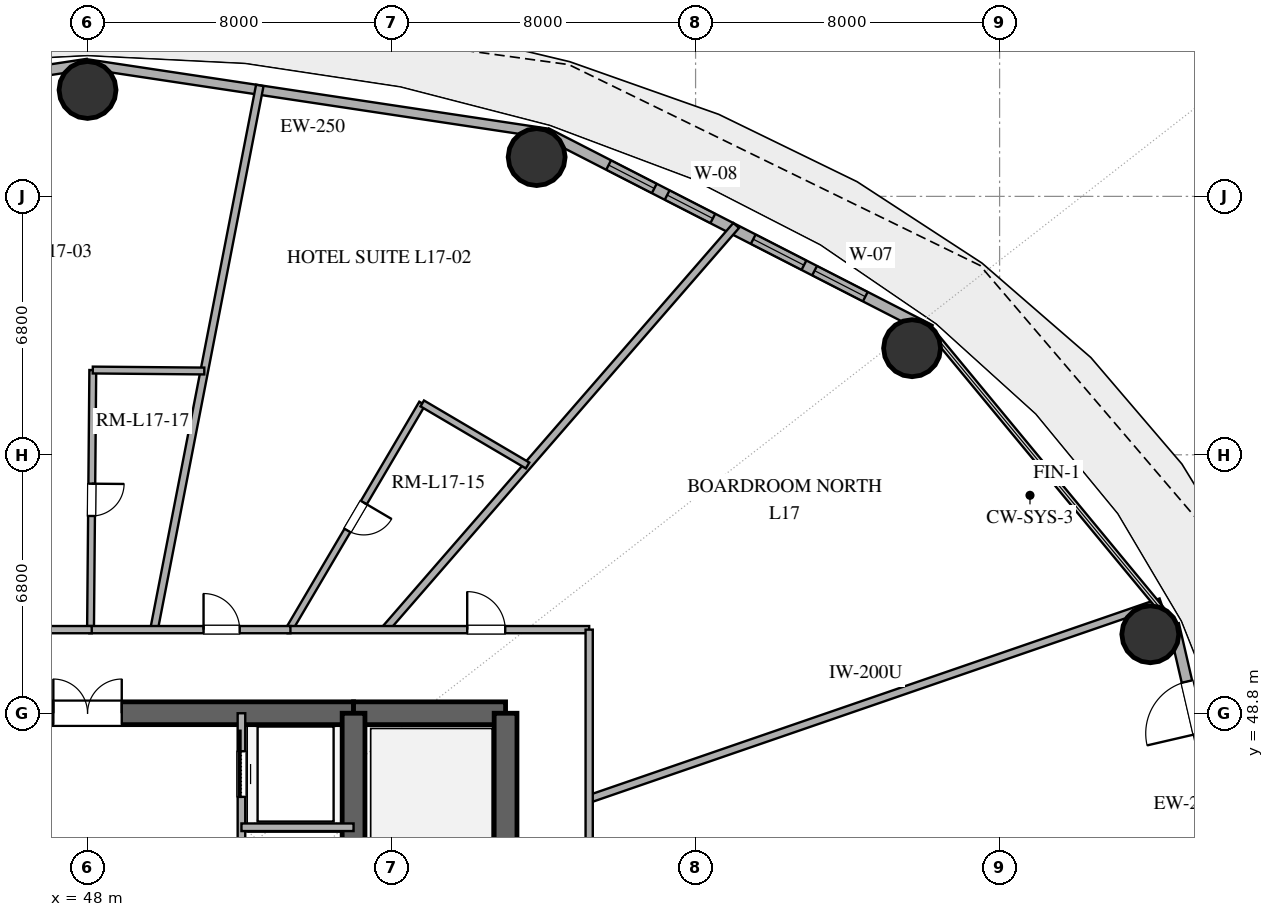
"""IFC4 building model, lengths in metres.
Left out: names, types, materials, properties, quantities, classifications, styles, units other than length and angle.
Written with IfcOpenShell. Run it as: python <this file> out.ifc"""

import sys

from ifc_helpers import new_model, si_unit, direction, frame, frame_2d, origin, origin_2d, place, context, subcontext, project, spatial, rectangle, hollow_circle, extrude, element, fill, save


model = new_model("IFC4")
c1 = context("Model", 3, precision=1e-05, world=origin(), true_north=direction((0.0, 1.0)))
c2 = subcontext(c1, "Body", "Model", "MODEL_VIEW")
j1 = project(units=[si_unit("LENGTHUNIT", "METRE"), si_unit("PLANEANGLEUNIT", "RADIAN")], contexts=[c1])
p1 = place(None, origin())
s1 = spatial("IfcSite", under=j1, at=p1, CompositionType="ELEMENT")
p2 = place(p1, origin())
s2 = spatial("IfcBuilding", under=s1, at=p2, CompositionType="ELEMENT")
p3 = place(p2, frame((0.0, 0.0, 71.4)))
s3 = spatial("IfcBuildingStorey", under=s2, at=p3, CompositionType="ELEMENT", Elevation=71.4)
p4 = place(p3, frame((41.0, 48.8, 0.0), z_axis=(0.0, 0.0, 1.0), x_axis=(1.0, 0.0, 0.0)))
e1 = element("IfcWall", 1, at=p4, inside=s3, PredefinedType="SHEAR", context=c2, shape_type="SweptSolid", body=[
    extrude(rectangle(XDim=14.0, YDim=0.6, at=frame_2d((7.0, 0.0))), origin(), (0.0, 0.0, 1.0), 3.38),
])
p5 = place(p4, frame((6.1, 0.0, 0.0)))
e2 = element("IfcOpeningElement", 2, at=p5, cuts=e1, PredefinedType="OPENING", context=c2, shape_type="SweptSolid", body=[
    extrude(rectangle(XDim=1.8, YDim=2.25, at=frame_2d((0.9, 1.125))), frame((0.0, 0.31, 0.0), z_axis=(0.0, -1.0, 0.0), x_axis=(1.0, 0.0, 0.0)), (0.0, 0.0, 1.0), 0.62),
])
p6 = place(p3, frame((55.0, 48.8, 0.0), z_axis=(0.0, 0.0, 1.0), x_axis=(1.0, 0.0, 0.0)))
e3 = element("IfcWall", 3, at=p6, inside=s3, PredefinedType="SHEAR", context=c2, shape_type="SweptSolid", body=[
    extrude(rectangle(XDim=4.0, YDim=0.6, at=frame_2d((2.0, 0.0))), origin(), (0.0, 0.0, 1.0), 3.38),
])
p7 = place(p3, frame((59.0, 35.2, 0.0), z_axis=(0.0, 0.0, 1.0), x_axis=(0.0, 1.0, 0.0)))
e4 = element("IfcWall", 4, at=p7, inside=s3, PredefinedType="SHEAR", context=c2, shape_type="SweptSolid", body=[
    extrude(rectangle(XDim=13.6, YDim=0.6, at=frame_2d((6.8, 0.0))), origin(), (0.0, 0.0, 1.0), 3.38),
])
p8 = place(p7, frame((1.5, 0.0, 0.0)))
e5 = element("IfcOpeningElement", 5, at=p8, cuts=e4, PredefinedType="OPENING", context=c2, shape_type="SweptSolid", body=[
    extrude(rectangle(XDim=1.2, YDim=2.15, at=frame_2d((0.6, 1.075))), frame((0.0, 0.31, 0.0), z_axis=(0.0, -1.0, 0.0), x_axis=(1.0, 0.0, 0.0)), (0.0, 0.0, 1.0), 0.62),
])
p9 = place(p3, frame((55.0, 35.2, 0.0), z_axis=(0.0, 0.0, 1.0), x_axis=(0.0, 1.0, 0.0)))
e6 = element("IfcWall", 6, at=p9, inside=s3, PredefinedType="SHEAR", context=c2, shape_type="SweptSolid", body=[
    extrude(rectangle(XDim=13.6, YDim=0.6, at=frame_2d((6.8, 0.0))), origin(), (0.0, 0.0, 1.0), 3.38),
])
p10 = place(p9, frame((1.15, 0.0, 0.0)))
e7 = element("IfcOpeningElement", 7, at=p10, cuts=e6, PredefinedType="OPENING", context=c2, shape_type="SweptSolid", body=[
    extrude(rectangle(XDim=1.1, YDim=2.2, at=frame_2d((0.55, 1.1))), frame((0.0, 0.31, 0.0), z_axis=(0.0, -1.0, 0.0), x_axis=(1.0, 0.0, 0.0)), (0.0, 0.0, 1.0), 0.62),
])
for number, where, z_axis, x_axis in (
    (8, (75.966, 50.878, 0.0), (0.0, 0.0, 1.0), (1.0, 0.0, 0.0)),
    (9, (69.697, 58.405, 0.0), (0.0, 0.0, 1.0), (1.0, 0.0, 0.0)),
    (10, (59.818, 63.434, 0.0), (0.0, 0.0, 1.0), (1.0, 0.0, 0.0)),
    (11, (48.0, 65.2, 0.0), (0.0, 0.0, 1.0), (1.0, 0.0, 0.0)),
):
    element("IfcColumn", number, at=place(p3, frame(where, z_axis=z_axis, x_axis=x_axis)), inside=s3, PredefinedType="COLUMN", context=c2, shape_type="SweptSolid", body=[
        extrude(hollow_circle(Radius=0.75, WallThickness=0.04, at=origin_2d()), origin(), (0.0, 0.0, 1.0), 3.38),
    ])
p11 = place(p3, frame((78.696, 42.0, 0.0), z_axis=(0.0, 0.0, 1.0), x_axis=(-0.225454452941, 0.974253709076, 0.0)))
e12 = element("IfcWall", 12, at=p11, inside=s3, PredefinedType="SOLIDWALL", context=c2, shape_type="SweptSolid", body=[
    extrude(rectangle(XDim=9.38, YDim=0.28, at=frame_2d((4.69, 0.0))), origin(), (0.0, 0.0, 1.0), 3.38),
])
p12 = place(p11, frame((6.435, 0.0, 0.0)))
e13 = element("IfcOpeningElement", 13, at=p12, cuts=e12, PredefinedType="OPENING", context=c2, shape_type="SweptSolid", body=[
    extrude(rectangle(XDim=1.4, YDim=2.2, at=frame_2d((0.7, 1.1))), frame((0.0, 0.15, 0.0), z_axis=(0.0, -1.0, 0.0), x_axis=(1.0, 0.0, 0.0)), (0.0, 0.0, 1.0), 0.3),
])
p13 = place(p3, frame((70.174, 58.886, 0.0), z_axis=(0.0, 0.0, 1.0), x_axis=(-0.889853976658, 0.456245438581, 0.0)))
e14 = element("IfcWall", 14, at=p13, inside=s3, PredefinedType="SOLIDWALL", context=c2, shape_type="SweptSolid", body=[
    extrude(rectangle(XDim=11.346, YDim=0.28, at=frame_2d((5.673, 0.0))), origin(), (0.0, 0.0, 1.0), 3.38),
])
p14 = place(p13, frame((1.92, 0.0, 0.85)))
e15 = element("IfcOpeningElement", 15, at=p14, cuts=e14, PredefinedType="OPENING", context=c2, shape_type="SweptSolid", body=[
    extrude(rectangle(XDim=1.5, YDim=1.8, at=frame_2d((0.75, 0.9))), frame((0.0, 0.15, 0.0), z_axis=(0.0, -1.0, 0.0), x_axis=(1.0, 0.0, 0.0)), (0.0, 0.0, 1.0), 0.3),
])
p15 = place(p13, frame((3.734, 0.0, 0.85)))
e16 = element("IfcOpeningElement", 16, at=p15, cuts=e14, PredefinedType="OPENING", context=c2, shape_type="SweptSolid", body=[
    extrude(rectangle(XDim=1.5, YDim=1.8, at=frame_2d((0.75, 0.9))), frame((0.0, 0.15, 0.0), z_axis=(0.0, -1.0, 0.0), x_axis=(1.0, 0.0, 0.0)), (0.0, 0.0, 1.0), 0.3),
])
p16 = place(p13, frame((6.429, 0.0, 0.85)))
e17 = element("IfcOpeningElement", 17, at=p16, cuts=e14, PredefinedType="OPENING", context=c2, shape_type="SweptSolid", body=[
    extrude(rectangle(XDim=1.35, YDim=1.8, at=frame_2d((0.675, 0.9))), frame((0.0, 0.15, 0.0), z_axis=(0.0, -1.0, 0.0), x_axis=(1.0, 0.0, 0.0)), (0.0, 0.0, 1.0), 0.3),
])
p17 = place(p13, frame((8.16, 0.0, 0.85)))
e18 = element("IfcOpeningElement", 18, at=p17, cuts=e14, PredefinedType="OPENING", context=c2, shape_type="SweptSolid", body=[
    extrude(rectangle(XDim=1.35, YDim=1.8, at=frame_2d((0.675, 0.9))), frame((0.0, 0.15, 0.0), z_axis=(0.0, -1.0, 0.0), x_axis=(1.0, 0.0, 0.0)), (0.0, 0.0, 1.0), 0.3),
])
p18 = place(p3, frame((60.078, 64.062, 0.0), z_axis=(0.0, 0.0, 1.0), x_axis=(-0.988864835849, 0.148816452121, 0.0)))
e19 = element("IfcWall", 19, at=p18, inside=s3, PredefinedType="SOLIDWALL", context=c2, shape_type="SweptSolid", body=[
    extrude(rectangle(XDim=12.214, YDim=0.25, at=frame_2d((6.107, 0.0))), origin(), (0.0, 0.0, 1.0), 3.38),
])
p19 = place(p3, frame((48.0, 65.88, 0.0), z_axis=(0.0, 0.0, 1.0), x_axis=(-0.988864835849, -0.148816452121, 0.0)))
e20 = element("IfcWall", 20, at=p19, inside=s3, PredefinedType="SOLIDWALL", context=c2, shape_type="SweptSolid", body=[
    extrude(rectangle(XDim=12.214, YDim=0.28, at=frame_2d((6.107, 0.0))), origin(), (0.0, 0.0, 1.0), 3.38),
])
p20 = place(p19, frame((1.531, 0.0, 0.0)))
e21 = element("IfcOpeningElement", 21, at=p20, cuts=e20, PredefinedType="OPENING", context=c2, shape_type="SweptSolid", body=[
    extrude(rectangle(XDim=1.1, YDim=2.25, at=frame_2d((0.55, 1.125))), frame((0.0, 0.15, 0.0), z_axis=(0.0, -1.0, 0.0), x_axis=(1.0, 0.0, 0.0)), (0.0, 0.0, 1.0), 0.3),
])
p21 = place(p19, frame((8.814, 0.0, 0.85)))
e22 = element("IfcOpeningElement", 22, at=p21, cuts=e20, PredefinedType="OPENING", context=c2, shape_type="SweptSolid", body=[
    extrude(rectangle(XDim=1.2, YDim=1.6, at=frame_2d((0.6, 0.8))), frame((0.0, 0.15, 0.0), z_axis=(0.0, -1.0, 0.0), x_axis=(1.0, 0.0, 0.0)), (0.0, 0.0, 1.0), 0.3),
])
p22 = place(p3, frame((52.05, 38.4, 0.0), z_axis=(0.0, 0.0, 1.0), x_axis=(0.0, 1.0, 0.0)))
e23 = element("IfcWall", 23, at=p22, inside=s3, PredefinedType="SOLIDWALL", context=c2, shape_type="SweptSolid", body=[
    extrude(rectangle(XDim=10.4, YDim=0.2, at=frame_2d((5.2, 0.0))), origin(), (0.0, 0.0, 1.0), 2.74),
])
p23 = place(p22, frame((8.2, 0.0, 0.0)))
e24 = element("IfcOpeningElement", 24, at=p23, cuts=e23, PredefinedType="OPENING", context=c2, shape_type="SweptSolid", body=[
    extrude(rectangle(XDim=1.2, YDim=2.2, at=frame_2d((0.6, 1.1))), frame((0.0, 0.11, 0.0), z_axis=(0.0, -1.0, 0.0), x_axis=(1.0, 0.0, 0.0)), (0.0, 0.0, 1.0), 0.22),
])
p24 = place(p3, frame((52.05, 45.8, 0.0), z_axis=(0.0, 0.0, 1.0), x_axis=(1.0, 0.0, 0.0)))
e25 = element("IfcWall", 25, at=p24, inside=s3, PredefinedType="SOLIDWALL", context=c2, shape_type="SweptSolid", body=[
    extrude(rectangle(XDim=2.95, YDim=0.2, at=frame_2d((1.475, 0.0))), origin(), (0.0, 0.0, 1.0), 2.74),
])
p25 = place(p3, frame((61.2, 46.545, 0.0), z_axis=(0.0, 0.0, 1.0), x_axis=(0.945518845989, 0.325567369186, 0.0)))
e26 = element("IfcWall", 26, at=p25, inside=s3, PredefinedType="PARTITIONING", context=c2, shape_type="SweptSolid", body=[
    extrude(rectangle(XDim=15.909, YDim=0.2, at=frame_2d((7.955, 0.0))), origin(), (0.0, 0.0, 1.0), 2.74),
])
p26 = place(p3, frame((55.823, 51.0, 0.0), z_axis=(0.0, 0.0, 1.0), x_axis=(0.656066321773, 0.754703240641, 0.0)))
e27 = element("IfcWall", 27, at=p26, inside=s3, PredefinedType="PARTITIONING", context=c2, shape_type="SweptSolid", body=[
    extrude(rectangle(XDim=14.091, YDim=0.2, at=frame_2d((7.045, 0.0))), origin(), (0.0, 0.0, 1.0), 2.74),
])
p27 = place(p3, frame((49.749, 51.0, 0.0), z_axis=(0.0, 0.0, 1.0), x_axis=(0.190815454206, 0.981625927956, 0.0)))
e28 = element("IfcWall", 28, at=p27, inside=s3, PredefinedType="PARTITIONING", context=c2, shape_type="SweptSolid", body=[
    extrude(rectangle(XDim=14.587, YDim=0.2, at=frame_2d((7.293, 0.0))), origin(), (0.0, 0.0, 1.0), 2.74),
])
p28 = place(p3, frame((56.807, 56.952, 0.0), z_axis=(0.0, 0.0, 1.0), x_axis=(-0.507529744585, -0.861634236995, 0.0)))
e29 = element("IfcWall", 29, at=p28, inside=s3, PredefinedType="PLUMBINGWALL", context=c2, shape_type="SweptSolid", body=[
    extrude(rectangle(XDim=6.908, YDim=0.18, at=frame_2d((3.454, 0.0))), origin(), (0.0, 0.0, 1.0), 2.74),
])
p29 = place(p28, frame((3.029, 0.0, 0.0)))
e30 = element("IfcOpeningElement", 30, at=p29, cuts=e29, PredefinedType="OPENING", context=c2, shape_type="SweptSolid", body=[
    extrude(rectangle(XDim=0.85, YDim=2.1, at=frame_2d((0.425, 1.05))), frame((0.0, 0.1, 0.0), z_axis=(0.0, -1.0, 0.0), x_axis=(1.0, 0.0, 0.0)), (0.0, 0.0, 1.0), 0.2),
])
p30 = place(p3, frame((48.138, 57.83, 0.0), z_axis=(0.0, 0.0, 1.0), x_axis=(-0.008721118088, -0.999961970327, 0.0)))
e31 = element("IfcWall", 31, at=p30, inside=s3, PredefinedType="PLUMBINGWALL", context=c2, shape_type="SweptSolid", body=[
    extrude(rectangle(XDim=6.831, YDim=0.18, at=frame_2d((3.415, 0.0))), origin(), (0.0, 0.0, 1.0), 2.74),
])
p31 = place(p30, frame((2.99, 0.0, 0.0)))
e32 = element("IfcOpeningElement", 32, at=p31, cuts=e31, PredefinedType="OPENING", context=c2, shape_type="SweptSolid", body=[
    extrude(rectangle(XDim=0.85, YDim=2.1, at=frame_2d((0.425, 1.05))), frame((0.0, 0.1, 0.0), z_axis=(0.0, -1.0, 0.0), x_axis=(1.0, 0.0, 0.0)), (0.0, 0.0, 1.0), 0.2),
])
p32 = place(p3, frame((53.264, 51.0, 0.0), z_axis=(0.0, 0.0, 1.0), x_axis=(1.0, 0.0, 0.0)))
e33 = element("IfcWall", 33, at=p32, inside=s3, PredefinedType="PARTITIONING", context=c2, shape_type="SweptSolid", body=[
    extrude(rectangle(XDim=7.936, YDim=0.19, at=frame_2d((3.968, 0.0))), origin(), (0.0, 0.0, 1.0), 2.74),
])
p33 = place(p32, frame((4.726, 0.0, 0.0)))
e34 = element("IfcOpeningElement", 34, at=p33, cuts=e33, PredefinedType="OPENING", context=c2, shape_type="SweptSolid", body=[
    extrude(rectangle(XDim=1.0, YDim=2.2, at=frame_2d((0.5, 1.1))), frame((0.0, 0.105, 0.0), z_axis=(0.0, -1.0, 0.0), x_axis=(1.0, 0.0, 0.0)), (0.0, 0.0, 1.0), 0.21),
])
p34 = place(p3, frame((61.2, 51.0, 0.0), z_axis=(0.0, 0.0, 1.0), x_axis=(0.0, -1.0, 0.0)))
e35 = element("IfcWall", 35, at=p34, inside=s3, PredefinedType="PARTITIONING", context=c2, shape_type="SweptSolid", body=[
    extrude(rectangle(XDim=9.147, YDim=0.19, at=frame_2d((4.574, 0.0))), origin(), (0.0, 0.0, 1.0), 2.74),
])
p35 = place(p34, frame((6.309, 0.0, 0.0)))
e36 = element("IfcOpeningElement", 36, at=p35, cuts=e35, PredefinedType="OPENING", context=c2, shape_type="SweptSolid", body=[
    extrude(rectangle(XDim=0.95, YDim=2.15, at=frame_2d((0.475, 1.075))), frame((0.0, 0.105, 0.0), z_axis=(0.0, -1.0, 0.0), x_axis=(1.0, 0.0, 0.0)), (0.0, 0.0, 1.0), 0.21),
])
p36 = place(p3, frame((48.046, 51.0, 0.0), z_axis=(0.0, 0.0, 1.0), x_axis=(1.0, 0.0, 0.0)))
e37 = element("IfcWall", 37, at=p36, inside=s3, PredefinedType="PARTITIONING", context=c2, shape_type="SweptSolid", body=[
    extrude(rectangle(XDim=5.292, YDim=0.19, at=frame_2d((2.646, 0.0))), origin(), (0.0, 0.0, 1.0), 2.74),
])
p37 = place(p36, frame((3.006, 0.0, 0.0)))
e38 = element("IfcOpeningElement", 38, at=p37, cuts=e37, PredefinedType="OPENING", context=c2, shape_type="SweptSolid", body=[
    extrude(rectangle(XDim=0.95, YDim=2.15, at=frame_2d((0.475, 1.075))), frame((0.0, 0.105, 0.0), z_axis=(0.0, -1.0, 0.0), x_axis=(1.0, 0.0, 0.0)), (0.0, 0.0, 1.0), 0.21),
])
p38 = place(p3, frame((44.867, 51.0, 0.0), z_axis=(0.0, 0.0, 1.0), x_axis=(1.0, 0.0, 0.0)))
e39 = element("IfcWall", 39, at=p38, inside=s3, PredefinedType="PARTITIONING", context=c2, shape_type="SweptSolid", body=[
    extrude(rectangle(XDim=3.243, YDim=0.19, at=frame_2d((1.622, 0.0))), origin(), (0.0, 0.0, 1.0), 2.74),
])
p39 = place(p38, frame((1.146, 0.0, 0.0)))
e40 = element("IfcOpeningElement", 40, at=p39, cuts=e39, PredefinedType="OPENING", context=c2, shape_type="SweptSolid", body=[
    extrude(rectangle(XDim=0.95, YDim=2.15, at=frame_2d((0.475, 1.075))), frame((0.0, 0.105, 0.0), z_axis=(0.0, -1.0, 0.0), x_axis=(1.0, 0.0, 0.0)), (0.0, 0.0, 1.0), 0.21),
])
p40 = place(p3, frame((59.579, 55.32, 0.0), z_axis=(0.0, 0.0, 1.0), x_axis=(-0.861637458593, 0.507524275232, 0.0)))
e41 = element("IfcWall", 41, at=p40, inside=s3, PredefinedType="PLUMBINGWALL", context=c2, shape_type="SweptSolid", body=[
    extrude(rectangle(XDim=3.216, YDim=0.18, at=frame_2d((1.608, 0.0))), origin(), (0.0, 0.0, 1.0), 2.74),
])
p41 = place(p3, frame((51.072, 57.805, 0.0), z_axis=(0.0, 0.0, 1.0), x_axis=(-0.999961829169, 0.00873728818, 0.0)))
e42 = element("IfcWall", 42, at=p41, inside=s3, PredefinedType="PLUMBINGWALL", context=c2, shape_type="SweptSolid", body=[
    extrude(rectangle(XDim=2.934, YDim=0.18, at=frame_2d((1.467, 0.0))), origin(), (0.0, 0.0, 1.0), 2.74),
])
p42 = place(p12, origin())
e43 = element("IfcDoor", 43, at=p42, inside=s3, OperationType="SINGLE_SWING_LEFT", PredefinedType="DOOR", context=c2, shape_type="SweptSolid", body=[
    extrude(rectangle(XDim=1.4, YDim=2.2, at=frame_2d((0.7, 1.1))), frame((0.0, 0.025, 0.0), z_axis=(0.0, -1.0, 0.0), x_axis=(1.0, 0.0, 0.0)), (0.0, 0.0, 1.0), 0.05),
])
fill(e13, e43)
p43 = place(p14, origin())
e44 = element("IfcWindow", 44, at=p43, inside=s3, PartitioningType="SINGLE_PANEL", PredefinedType="WINDOW", context=c2, shape_type="SweptSolid", body=[
    extrude(rectangle(XDim=1.5, YDim=1.8, at=frame_2d((0.75, 0.9))), frame((0.0, 0.03, 0.0), z_axis=(0.0, -1.0, 0.0), x_axis=(1.0, 0.0, 0.0)), (0.0, 0.0, 1.0), 0.06),
])
fill(e15, e44)
p44 = place(p15, origin())
e45 = element("IfcWindow", 45, at=p44, inside=s3, PartitioningType="SINGLE_PANEL", PredefinedType="WINDOW", context=c2, shape_type="SweptSolid", body=[
    extrude(rectangle(XDim=1.5, YDim=1.8, at=frame_2d((0.75, 0.9))), frame((0.0, 0.03, 0.0), z_axis=(0.0, -1.0, 0.0), x_axis=(1.0, 0.0, 0.0)), (0.0, 0.0, 1.0), 0.06),
])
fill(e16, e45)
p45 = place(p16, origin())
e46 = element("IfcWindow", 46, at=p45, inside=s3, PartitioningType="SINGLE_PANEL", PredefinedType="WINDOW", context=c2, shape_type="SweptSolid", body=[
    extrude(rectangle(XDim=1.35, YDim=1.8, at=frame_2d((0.675, 0.9))), frame((0.0, 0.03, 0.0), z_axis=(0.0, -1.0, 0.0), x_axis=(1.0, 0.0, 0.0)), (0.0, 0.0, 1.0), 0.06),
])
fill(e17, e46)
p46 = place(p17, origin())
e47 = element("IfcWindow", 47, at=p46, inside=s3, PartitioningType="SINGLE_PANEL", PredefinedType="WINDOW", context=c2, shape_type="SweptSolid", body=[
    extrude(rectangle(XDim=1.35, YDim=1.8, at=frame_2d((0.675, 0.9))), frame((0.0, 0.03, 0.0), z_axis=(0.0, -1.0, 0.0), x_axis=(1.0, 0.0, 0.0)), (0.0, 0.0, 1.0), 0.06),
])
fill(e18, e47)
p47 = place(p5, origin())
e48 = element("IfcDoor", 48, at=p47, inside=s3, OperationType="DOUBLE_DOOR_SINGLE_SWING", PredefinedType="DOOR", context=c2, shape_type="SweptSolid", body=[
    extrude(rectangle(XDim=1.8, YDim=2.25, at=frame_2d((0.9, 1.125))), frame((0.0, 0.025, 0.0), z_axis=(0.0, -1.0, 0.0), x_axis=(1.0, 0.0, 0.0)), (0.0, 0.0, 1.0), 0.05),
])
fill(e2, e48)
p48 = place(p23, origin())
e49 = element("IfcDoor", 49, at=p48, inside=s3, OperationType="SLIDING_TO_RIGHT", PredefinedType="DOOR", context=c2, shape_type="SweptSolid", body=[
    extrude(rectangle(XDim=1.2, YDim=2.2, at=frame_2d((0.6, 1.1))), frame((0.0, 0.025, 0.0), z_axis=(0.0, -1.0, 0.0), x_axis=(1.0, 0.0, 0.0)), (0.0, 0.0, 1.0), 0.05),
])
fill(e24, e49)
p49 = place(p29, origin())
e50 = element("IfcDoor", 50, at=p49, inside=s3, OperationType="SINGLE_SWING_LEFT", PredefinedType="DOOR", context=c2, shape_type="SweptSolid", body=[
    extrude(rectangle(XDim=0.85, YDim=2.1, at=frame_2d((0.425, 1.05))), frame((0.0, 0.025, 0.0), z_axis=(0.0, -1.0, 0.0), x_axis=(1.0, 0.0, 0.0)), (0.0, 0.0, 1.0), 0.05),
])
fill(e30, e50)
p50 = place(p31, origin())
e51 = element("IfcDoor", 51, at=p50, inside=s3, OperationType="SINGLE_SWING_LEFT", PredefinedType="DOOR", context=c2, shape_type="SweptSolid", body=[
    extrude(rectangle(XDim=0.85, YDim=2.1, at=frame_2d((0.425, 1.05))), frame((0.0, 0.025, 0.0), z_axis=(0.0, -1.0, 0.0), x_axis=(1.0, 0.0, 0.0)), (0.0, 0.0, 1.0), 0.05),
])
fill(e32, e51)
p51 = place(p33, origin())
e52 = element("IfcDoor", 52, at=p51, inside=s3, OperationType="SINGLE_SWING_LEFT", PredefinedType="DOOR", context=c2, shape_type="SweptSolid", body=[
    extrude(rectangle(XDim=1.0, YDim=2.2, at=frame_2d((0.5, 1.1))), frame((0.0, 0.025, 0.0), z_axis=(0.0, -1.0, 0.0), x_axis=(1.0, 0.0, 0.0)), (0.0, 0.0, 1.0), 0.05),
])
fill(e34, e52)
p52 = place(p37, origin())
e53 = element("IfcDoor", 53, at=p52, inside=s3, OperationType="SINGLE_SWING_LEFT", PredefinedType="DOOR", context=c2, shape_type="SweptSolid", body=[
    extrude(rectangle(XDim=0.95, YDim=2.15, at=frame_2d((0.475, 1.075))), frame((0.0, 0.025, 0.0), z_axis=(0.0, -1.0, 0.0), x_axis=(1.0, 0.0, 0.0)), (0.0, 0.0, 1.0), 0.05),
])
fill(e38, e53)
save(model, sys.argv[1])
